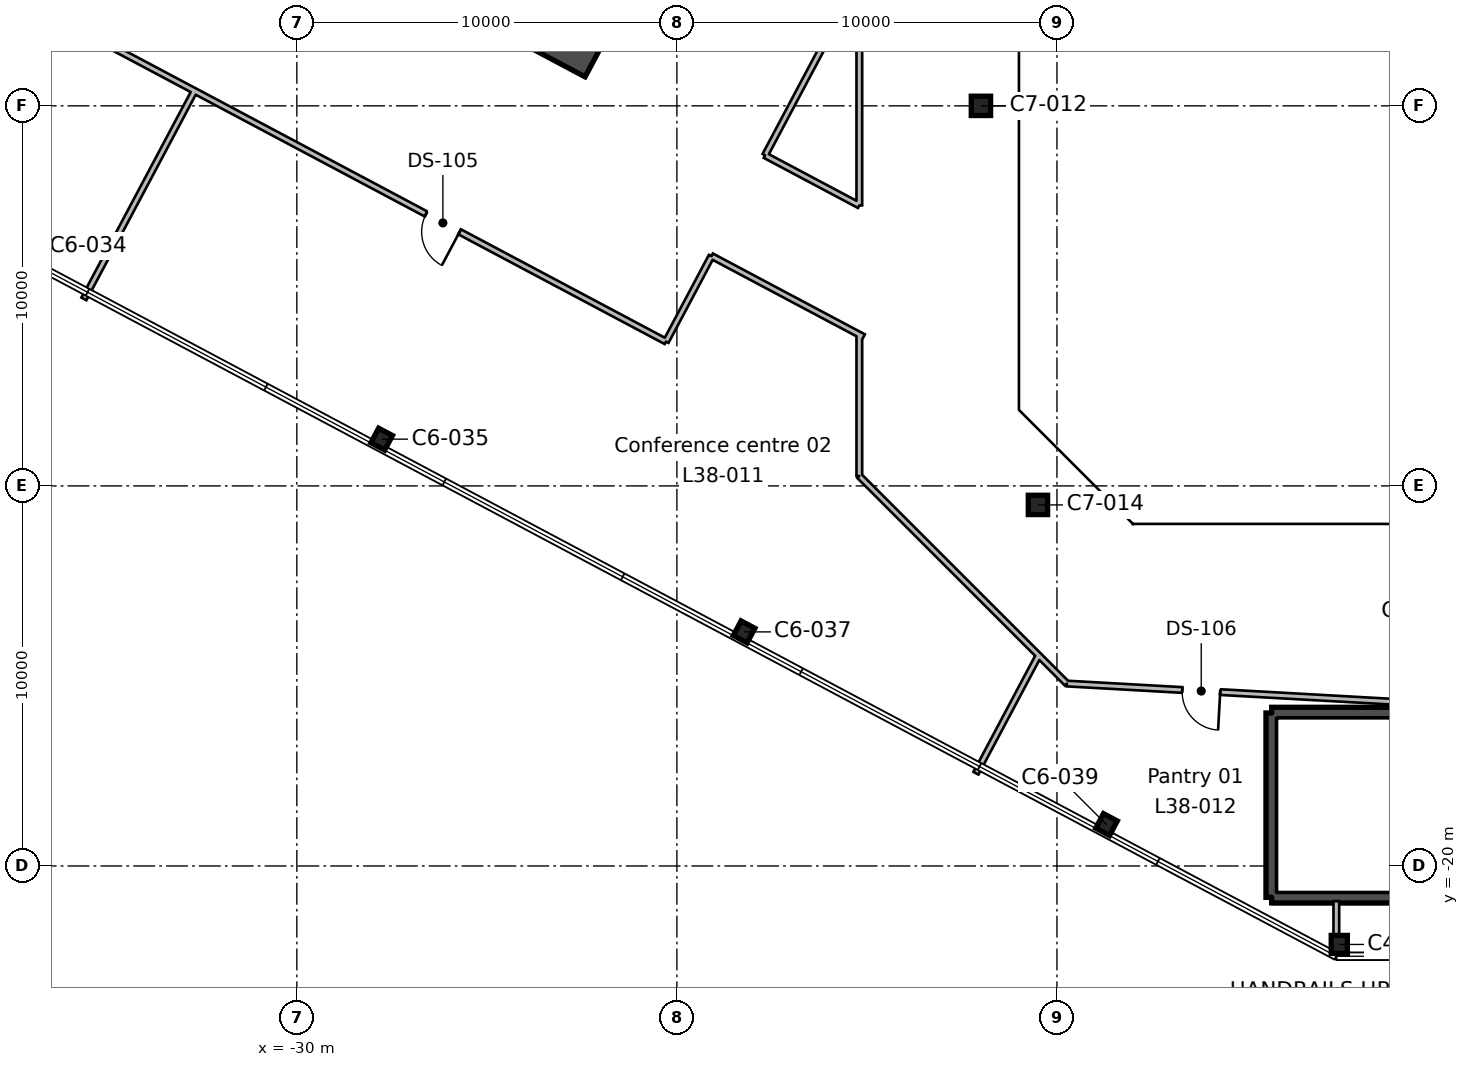
"""IFC4 building model, lengths in metres.
Left out: names, types, materials, properties, quantities, classifications, styles, units other than length and angle.
Written with IfcOpenShell. Run it as: python <this file> out.ifc"""

import sys

from ifc_helpers import new_model, si_unit, direction, frame, frame_2d, origin, origin_2d, place, context, subcontext, project, spatial, rectangle, hollow_rectangle, i_section, extrude, element, fill, save


model = new_model("IFC4")
c1 = context("Model", 3, precision=1e-05, world=origin(), true_north=direction((0.0, 1.0)))
c2 = subcontext(c1, "Body", "Model", "MODEL_VIEW")
j1 = project(units=[si_unit("LENGTHUNIT", "METRE"), si_unit("PLANEANGLEUNIT", "RADIAN")], contexts=[c1])
p1 = place(None, origin())
s1 = spatial("IfcSite", under=j1, at=p1, CompositionType="ELEMENT")
p2 = place(p1, origin())
s2 = spatial("IfcBuilding", under=s1, at=p2, CompositionType="ELEMENT")
p3 = place(p2, frame((0.0, 0.0, 178.2)))
s3 = spatial("IfcBuildingStorey", under=s2, at=p3, CompositionType="ELEMENT", Elevation=178.2)
p4 = place(p3, frame((-2.571, -22.065, 0.0), z_axis=(0.0, 0.0, 1.0), x_axis=(1.0, 0.0, 0.0)))
e1 = element("IfcColumn", 1, at=p4, inside=s3, PredefinedType="COLUMN", context=c2, shape_type="SweptSolid", body=[
    extrude(i_section(OverallWidth=0.424, OverallDepth=0.475, WebThickness=0.048, FlangeThickness=0.077, FilletRadius=0.015, at=origin_2d()), origin(), (0.0, 0.0, 1.0), 5.4),
])
for number, where, z_axis, x_axis in (
    (2, (-8.696, -18.911, 0.0), (0.0, 0.0, 1.0), (0.883, -0.469, 0.0)),
    (3, (-18.232, -13.841, 0.0), (0.0, 0.0, 1.0), (0.883, -0.469, 0.0)),
):
    element("IfcColumn", number, at=place(p3, frame(where, z_axis=z_axis, x_axis=x_axis)), inside=s3, PredefinedType="COLUMN", context=c2, shape_type="SweptSolid", body=[
        extrude(i_section(OverallWidth=0.412, OverallDepth=0.434, WebThickness=0.036, FlangeThickness=0.057, FilletRadius=0.015, at=origin_2d()), origin(), (0.0, 0.0, 1.0), 5.4),
    ])
p5 = place(p3, frame((-10.5, -10.5, 0.0), z_axis=(0.0, 0.0, 1.0), x_axis=(1.0, 0.0, 0.0)))
e4 = element("IfcColumn", 4, at=p5, inside=s3, PredefinedType="COLUMN", context=c2, shape_type="SweptSolid", body=[
    extrude(hollow_rectangle(XDim=0.508, YDim=0.508, WallThickness=0.012, InnerFilletRadius=0.006, OuterFilletRadius=0.018, at=origin_2d()), origin(), (0.0, 0.0, 1.0), 5.4),
])
p6 = place(p3, frame((-27.768, -8.77, 0.0), z_axis=(0.0, 0.0, 1.0), x_axis=(0.882947592859, -0.469471562786, 0.0)))
e5 = element("IfcColumn", 5, at=p6, inside=s3, PredefinedType="COLUMN", context=c2, shape_type="SweptSolid", body=[
    extrude(i_section(OverallWidth=0.412, OverallDepth=0.434, WebThickness=0.036, FlangeThickness=0.057, FilletRadius=0.015, at=origin_2d()), origin(), (0.0, 0.0, 1.0), 5.4),
])
p7 = place(p3, frame((-12.0, 0.0, 0.0), z_axis=(0.0, 0.0, 1.0), x_axis=(1.0, 0.0, 0.0)))
e6 = element("IfcColumn", 6, at=p7, inside=s3, PredefinedType="COLUMN", context=c2, shape_type="SweptSolid", body=[
    extrude(hollow_rectangle(XDim=0.508, YDim=0.508, WallThickness=0.012, InnerFilletRadius=0.006, OuterFilletRadius=0.018, at=origin_2d()), origin(), (0.0, 0.0, 1.0), 5.4),
])
p8 = place(p3, frame((-13.498, 18.333, 0.0), z_axis=(0.0, 0.0, 1.0), x_axis=(-0.469469918705, -0.88294846703, 0.0)))
e7 = element("IfcWall", 7, at=p8, inside=s3, PredefinedType="SHEAR", context=c2, shape_type="SweptSolid", body=[
    extrude(rectangle(XDim=19.7, YDim=0.75, at=frame_2d((9.85, 0.0))), origin(), (0.0, 0.0, 1.0), 5.4),
])
p9 = place(p8, frame((6.85, 0.0, 0.0)))
e8 = element("IfcOpeningElement", 8, at=p9, cuts=e7, PredefinedType="OPENING", context=c2, shape_type="SweptSolid", body=[
    extrude(rectangle(XDim=2.4, YDim=2.4, at=frame_2d((1.2, 1.2))), frame((0.0, 0.385, 0.0), z_axis=(0.0, -1.0, 0.0), x_axis=(1.0, 0.0, 0.0)), (0.0, 0.0, 1.0), 0.77),
])
p10 = place(p3, frame((-22.902, 1.446, 0.0), z_axis=(0.0, 0.0, 1.0), x_axis=(-0.88294509198, 0.469476266226, 0.0)))
e9 = element("IfcWall", 9, at=p10, inside=s3, PredefinedType="SHEAR", context=c2, shape_type="SweptSolid", body=[
    extrude(rectangle(XDim=20.2, YDim=0.75, at=frame_2d((10.1, 0.0))), origin(), (0.0, 0.0, 1.0), 5.4),
])
p11 = place(p3, frame((3.95, -20.825, 0.0), z_axis=(0.0, 0.0, 1.0), x_axis=(-1.0, 0.0, 0.0)))
e10 = element("IfcWall", 10, at=p11, inside=s3, PredefinedType="SHEAR", context=c2, shape_type="SweptSolid", body=[
    extrude(rectangle(XDim=8.3, YDim=0.3, at=frame_2d((4.15, 0.0))), origin(), (0.0, 0.0, 1.0), 5.4),
])
p12 = place(p3, frame((-4.35, -20.825, 0.0), z_axis=(0.0, 0.0, 1.0), x_axis=(0.0, 1.0, 0.0)))
e11 = element("IfcWall", 11, at=p12, inside=s3, PredefinedType="SHEAR", context=c2, shape_type="SweptSolid", body=[
    extrude(rectangle(XDim=4.85, YDim=0.3, at=frame_2d((2.425, 0.0))), origin(), (0.0, 0.0, 1.0), 5.4),
])
p13 = place(p3, frame((-4.35, -15.975, 0.0), z_axis=(0.0, 0.0, 1.0), x_axis=(1.0, 0.0, 0.0)))
e12 = element("IfcWall", 12, at=p13, inside=s3, PredefinedType="SHEAR", context=c2, shape_type="SweptSolid", body=[
    extrude(rectangle(XDim=8.3, YDim=0.3, at=frame_2d((4.15, 0.0))), origin(), (0.0, 0.0, 1.0), 5.4),
])
p14 = place(p13, frame((6.05, 0.0, 0.0)))
e13 = element("IfcOpeningElement", 13, at=p14, cuts=e12, PredefinedType="OPENING", context=c2, shape_type="SweptSolid", body=[
    extrude(rectangle(XDim=1.9, YDim=2.1, at=frame_2d((0.95, 1.05))), frame((0.0, 0.16, 0.0), z_axis=(0.0, -1.0, 0.0), x_axis=(1.0, 0.0, 0.0)), (0.0, 0.0, 1.0), 0.32),
])
p15 = place(p3, frame((-32.692, 0.394, 0.0), z_axis=(0.0, 0.0, 1.0), x_axis=(-0.469533299698, -0.882914763992, 0.0)))
e14 = element("IfcWall", 14, at=p15, inside=s3, PredefinedType="PARTITIONING", context=c2, shape_type="SweptSolid", body=[
    extrude(rectangle(XDim=6.2, YDim=0.15, at=frame_2d((3.1, 0.0))), origin(), (0.0, 0.0, 1.0), 4.95),
])
p16 = place(p3, frame((-31.992, 0.022, 0.0), z_axis=(0.0, 0.0, 1.0), x_axis=(-0.882949241478, 0.469468462172, 0.0)))
e15 = element("IfcWall", 15, at=p16, inside=s3, PredefinedType="PARTITIONING", context=c2, shape_type="SweptSolid", body=[
    extrude(rectangle(XDim=15.803, YDim=0.15, at=frame_2d((7.901, 0.0))), origin(), (0.0, 0.0, 1.0), 4.95),
])
p17 = place(p16, frame((7.449, 0.0, 0.0)))
e16 = element("IfcOpeningElement", 16, at=p17, cuts=e15, PredefinedType="OPENING", context=c2, shape_type="SweptSolid", body=[
    extrude(rectangle(XDim=1.0, YDim=2.1, at=frame_2d((0.5, 1.05))), frame((0.0, 0.085, 0.0), z_axis=(0.0, -1.0, 0.0), x_axis=(1.0, 0.0, 0.0)), (0.0, 0.0, 1.0), 0.17),
])
p18 = place(p3, frame((-20.286, -6.202, 0.0), z_axis=(0.0, 0.0, 1.0), x_axis=(-0.882958308518, 0.469451409007, 0.0)))
e17 = element("IfcWall", 17, at=p18, inside=s3, PredefinedType="PARTITIONING", context=c2, shape_type="SweptSolid", body=[
    extrude(rectangle(XDim=13.258, YDim=0.15, at=frame_2d((6.629, 0.0))), origin(), (0.0, 0.0, 1.0), 4.95),
])
p19 = place(p18, frame((6.15, 0.0, 0.0)))
e18 = element("IfcOpeningElement", 18, at=p19, cuts=e17, PredefinedType="OPENING", context=c2, shape_type="SweptSolid", body=[
    extrude(rectangle(XDim=1.0, YDim=2.1, at=frame_2d((0.5, 1.05))), frame((0.0, 0.085, 0.0), z_axis=(0.0, -1.0, 0.0), x_axis=(1.0, 0.0, 0.0)), (0.0, 0.0, 1.0), 0.17),
])
p20 = place(p3, frame((-20.287, -6.202, 0.0), z_axis=(0.0, 0.0, 1.0), x_axis=(0.469737002115, 0.882806405077, 0.0)))
e19 = element("IfcWall", 19, at=p20, inside=s3, PredefinedType="PARTITIONING", context=c2, shape_type="SweptSolid", body=[
    extrude(rectangle(XDim=2.546, YDim=0.15, at=frame_2d((1.273, 0.0))), origin(), (0.0, 0.0, 1.0), 4.95),
])
p21 = place(p3, frame((-19.089, -3.951, 0.0), z_axis=(0.0, 0.0, 1.0), x_axis=(0.882996405651, -0.46937974776, 0.0)))
e20 = element("IfcWall", 20, at=p21, inside=s3, PredefinedType="PARTITIONING", context=c2, shape_type="SweptSolid", body=[
    extrude(rectangle(XDim=4.531, YDim=0.15, at=frame_2d((2.266, 0.0))), origin(), (0.0, 0.0, 1.0), 4.95),
])
p22 = place(p3, frame((-10.605, -14.334, 0.0), z_axis=(0.0, 0.0, 1.0), x_axis=(-0.707181925371, 0.707031629016, 0.0)))
e21 = element("IfcWall", 21, at=p22, inside=s3, PredefinedType="PARTITIONING", context=c2, shape_type="SweptSolid", body=[
    extrude(rectangle(XDim=6.498, YDim=0.15, at=frame_2d((3.249, 0.0))), origin(), (0.0, 0.0, 1.0), 4.95),
])
p23 = place(p3, frame((-15.2, -9.74, 0.0), z_axis=(0.0, 0.0, 1.0), x_axis=(0.0, 1.0, 0.0)))
e22 = element("IfcWall", 22, at=p23, inside=s3, PredefinedType="PARTITIONING", context=c2, shape_type="SweptSolid", body=[
    extrude(rectangle(XDim=3.685, YDim=0.15, at=frame_2d((1.843, 0.0))), origin(), (0.0, 0.0, 1.0), 4.95),
])
p24 = place(p3, frame((-10.482, -14.458, 0.0), z_axis=(0.0, 0.0, 1.0), x_axis=(-0.469639476558, -0.88285829104, 0.0)))
e23 = element("IfcWall", 23, at=p24, inside=s3, PredefinedType="PARTITIONING", context=c2, shape_type="SweptSolid", body=[
    extrude(rectangle(XDim=3.514, YDim=0.15, at=frame_2d((1.757, 0.0))), origin(), (0.0, 0.0, 1.0), 4.95),
])
p25 = place(p3, frame((-9.74, -15.2, 0.0), z_axis=(0.0, 0.0, 1.0), x_axis=(-0.706707736823, 0.707505600483, 0.0)))
e24 = element("IfcWall", 24, at=p25, inside=s3, PredefinedType="PARTITIONING", context=c2, shape_type="SweptSolid", body=[
    extrude(rectangle(XDim=1.224, YDim=0.15, at=frame_2d((0.612, 0.0))), origin(), (0.0, 0.0, 1.0), 4.95),
])
p26 = place(p3, frame((-2.659, -15.595, 0.0), z_axis=(0.0, 0.0, 1.0), x_axis=(-0.998447616415, 0.055698808556, 0.0)))
e25 = element("IfcWall", 25, at=p26, inside=s3, PredefinedType="PARTITIONING", context=c2, shape_type="SweptSolid", body=[
    extrude(rectangle(XDim=7.092, YDim=0.15, at=frame_2d((3.546, 0.0))), origin(), (0.0, 0.0, 1.0), 4.95),
])
p27 = place(p26, frame((3.05, 0.0, 0.0)))
e26 = element("IfcOpeningElement", 26, at=p27, cuts=e25, PredefinedType="OPENING", context=c2, shape_type="SweptSolid", body=[
    extrude(rectangle(XDim=1.0, YDim=2.1, at=frame_2d((0.5, 1.05))), frame((0.0, 0.085, 0.0), z_axis=(0.0, -1.0, 0.0), x_axis=(1.0, 0.0, 0.0)), (0.0, 0.0, 1.0), 0.17),
])
p28 = place(p3, frame((-0.698, -15.705, 0.0), z_axis=(0.0, 0.0, 1.0), x_axis=(-0.998427284327, 0.056062089795, 0.0)))
e27 = element("IfcWall", 27, at=p28, inside=s3, PredefinedType="PARTITIONING", context=c2, shape_type="SweptSolid", body=[
    extrude(rectangle(XDim=1.964, YDim=0.15, at=frame_2d((0.982, 0.0))), origin(), (0.0, 0.0, 1.0), 4.95),
])
p29 = place(p3, frame((-2.649, -20.925, 0.0), z_axis=(0.0, 0.0, 1.0), x_axis=(0.0, -1.0, 0.0)))
e28 = element("IfcWall", 28, at=p29, inside=s3, PredefinedType="PARTITIONING", context=c2, shape_type="SweptSolid", body=[
    extrude(rectangle(XDim=0.903, YDim=0.15, at=frame_2d((0.451, 0.0))), origin(), (0.0, 0.0, 1.0), 4.95),
])
p30 = place(p3, frame((-15.2, -2.621, 0.0), z_axis=(0.0, 0.0, 1.0), x_axis=(0.0, 1.0, 0.0)))
e29 = element("IfcWall", 29, at=p30, inside=s3, PredefinedType="PARTITIONING", context=c2, shape_type="SweptSolid", body=[
    extrude(rectangle(XDim=5.985, YDim=0.15, at=frame_2d((2.993, 0.0))), origin(), (0.0, 0.0, 1.0), 4.95),
])
p31 = place(p3, frame((-15.2, 3.364, 0.0), z_axis=(0.0, 0.0, 1.0), x_axis=(-0.469470458601, -0.882948179963, 0.0)))
e30 = element("IfcWall", 30, at=p31, inside=s3, PredefinedType="PARTITIONING", context=c2, shape_type="SweptSolid", body=[
    extrude(rectangle(XDim=5.285, YDim=0.15, at=frame_2d((2.642, 0.0))), origin(), (0.0, 0.0, 1.0), 4.95),
])
p32 = place(p3, frame((-17.681, -1.302, 0.0), z_axis=(0.0, 0.0, 1.0), x_axis=(0.882955921388, -0.469455898766, 0.0)))
e31 = element("IfcWall", 31, at=p32, inside=s3, PredefinedType="PARTITIONING", context=c2, shape_type="SweptSolid", body=[
    extrude(rectangle(XDim=2.81, YDim=0.15, at=frame_2d((1.405, 0.0))), origin(), (0.0, 0.0, 1.0), 4.95),
])
p33 = place(p19, origin())
e32 = element("IfcDoor", 32, at=p33, inside=s3, OperationType="SINGLE_SWING_LEFT", PredefinedType="DOOR", context=c2, shape_type="SweptSolid", body=[
    extrude(rectangle(XDim=1.0, YDim=2.1, at=frame_2d((0.5, 1.05))), frame((0.0, 0.025, 0.0), z_axis=(0.0, -1.0, 0.0), x_axis=(1.0, 0.0, 0.0)), (0.0, 0.0, 1.0), 0.05),
])
fill(e18, e32)
p34 = place(p27, origin())
e33 = element("IfcDoor", 33, at=p34, inside=s3, OperationType="SINGLE_SWING_LEFT", PredefinedType="DOOR", context=c2, shape_type="SweptSolid", body=[
    extrude(rectangle(XDim=1.0, YDim=2.1, at=frame_2d((0.5, 1.05))), frame((0.0, 0.025, 0.0), z_axis=(0.0, -1.0, 0.0), x_axis=(1.0, 0.0, 0.0)), (0.0, 0.0, 1.0), 0.05),
])
fill(e26, e33)
save(model, sys.argv[1])
